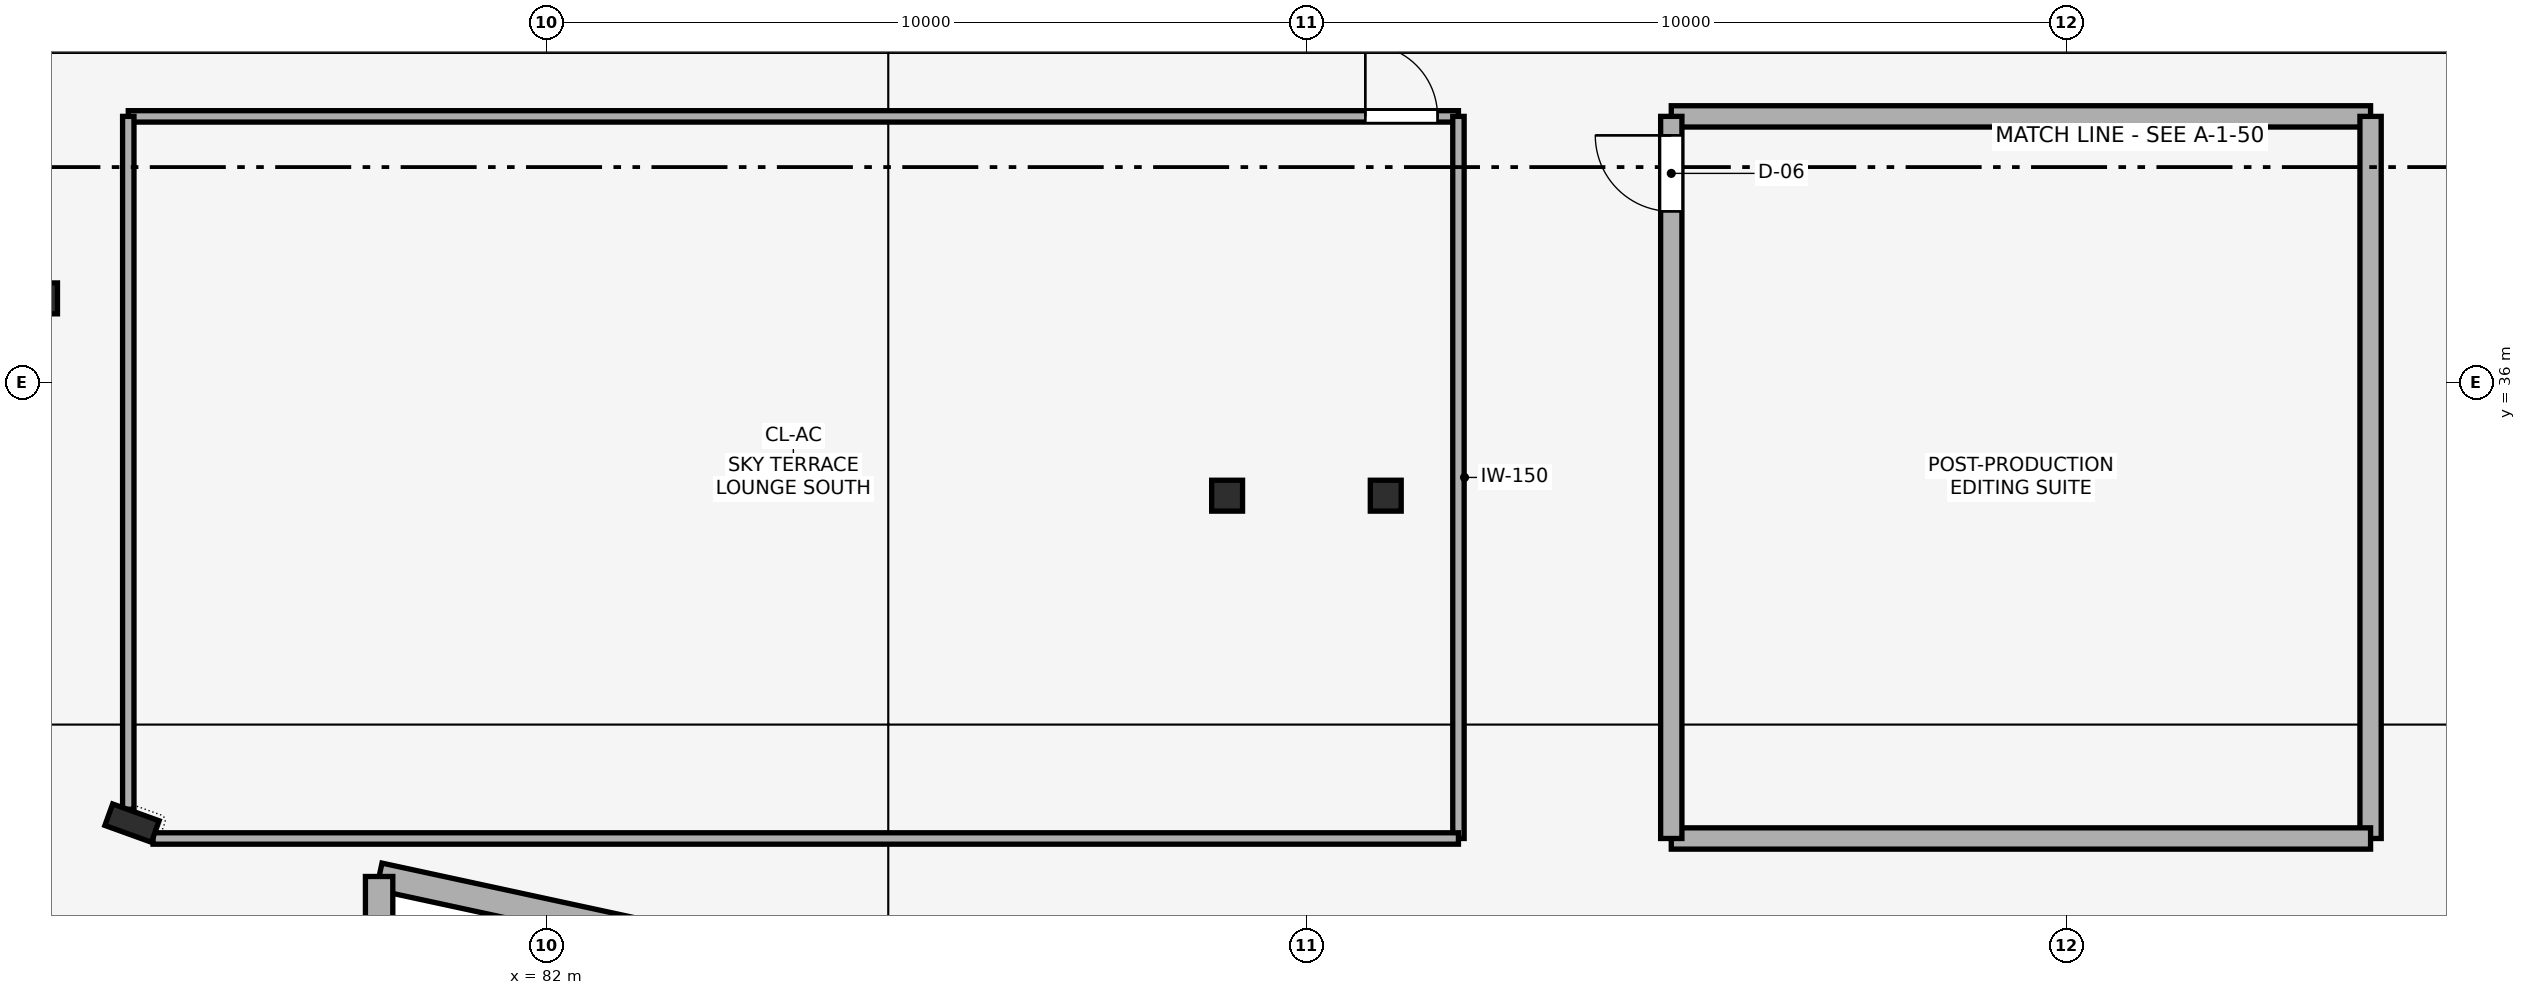
"""IFC4 building model, lengths in metres.
Left out: names, types, materials, properties, quantities, classifications, styles, units other than length and angle.
Written with IfcOpenShell. Run it as: python <this file> out.ifc"""

import sys

from ifc_helpers import new_model, si_unit, direction, frame, frame_2d, origin, origin_2d, place, context, subcontext, project, spatial, rectangle, hollow_circle, i_section, extrude, element, fill, save


model = new_model("IFC4")
c1 = context("Model", 3, precision=1e-05, world=origin(), true_north=direction((0.0, 1.0)))
c2 = subcontext(c1, "Body", "Model", "MODEL_VIEW")
j1 = project(units=[si_unit("LENGTHUNIT", "METRE"), si_unit("PLANEANGLEUNIT", "RADIAN")], contexts=[c1])
p1 = place(None, origin())
s1 = spatial("IfcSite", under=j1, at=p1, CompositionType="ELEMENT")
p2 = place(p1, origin())
s2 = spatial("IfcBuilding", under=s1, at=p2, CompositionType="ELEMENT")
p3 = place(p2, frame((0.0, 0.0, 19.5)))
s3 = spatial("IfcBuildingStorey", under=s2, at=p3, CompositionType="ELEMENT", Elevation=19.5)
p4 = place(p3, frame((76.549, 30.202, 0.0), z_axis=(0.0, 0.0, 1.0), x_axis=(-0.339558864524, -0.94058480613, 0.0)))
e1 = element("IfcColumn", 1, at=p4, inside=s3, PredefinedType="COLUMN", context=c2, shape_type="SweptSolid", body=[
    extrude(i_section(OverallWidth=0.3, OverallDepth=0.65, WebThickness=0.016, FlangeThickness=0.031, FilletRadius=0.027, at=origin_2d()), origin(), (0.0, 0.0, 1.0), 4.5),
])
for number, where, z_axis, x_axis in (
    (2, (75.365, 37.105, 0.0), (0.0, 0.0, 1.0), (1.0, 0.0, 0.0)),
    (3, (90.956, 34.51, 0.0), (0.0, 0.0, 1.0), (1.0, 0.0, 0.0)),
    (4, (93.044, 34.51, 0.0), (0.0, 0.0, 1.0), (1.0, 0.0, 0.0)),
):
    element("IfcColumn", number, at=place(p3, frame(where, z_axis=z_axis, x_axis=x_axis)), inside=s3, PredefinedType="COLUMN", context=c2, shape_type="SweptSolid", body=[
        extrude(hollow_circle(Radius=0.203, WallThickness=0.016, at=origin_2d()), origin(), (0.0, 0.0, 1.0), 4.5),
    ])
p5 = place(p3, frame((83.858, 28.623, 0.0), z_axis=(0.0, 0.0, 1.0), x_axis=(-0.9774404191, 0.211211332816, 0.0)))
e5 = element("IfcWall", 5, at=p5, inside=s3, PredefinedType="STANDARD", context=c2, shape_type="SweptSolid", body=[
    extrude(rectangle(XDim=4.152, YDim=0.36, at=frame_2d((2.076, 0.0))), origin(), (0.0, 0.0, 1.0), 3.562),
])
p6 = place(p3, frame((79.8, 29.5, 0.0), z_axis=(0.0, 0.0, 1.0), x_axis=(0.0, -1.0, 0.0)))
e6 = element("IfcWall", 6, at=p6, inside=s3, PredefinedType="STANDARD", context=c2, shape_type="SweptSolid", body=[
    extrude(rectangle(XDim=7.3, YDim=0.36, at=frame_2d((3.65, 0.0))), origin(), (0.0, 0.0, 1.0), 4.25),
])
p7 = place(p6, frame((2.25, 0.0, 0.9)))
e7 = element("IfcOpeningElement", 7, at=p7, cuts=e6, PredefinedType="OPENING", context=c2, shape_type="SweptSolid", body=[
    extrude(rectangle(XDim=2.8, YDim=1.9, at=frame_2d((1.4, 0.95))), frame((0.0, 0.19, 0.0), z_axis=(0.0, -1.0, 0.0), x_axis=(1.0, 0.0, 0.0)), (0.0, 0.0, 1.0), 0.38),
])
p8 = place(p3, frame((76.5, 39.5, 0.0), z_axis=(0.0, 0.0, 1.0), x_axis=(1.0, 0.0, 0.0)))
e8 = element("IfcWall", 8, at=p8, inside=s3, PredefinedType="PARTITIONING", context=c2, shape_type="SweptSolid", body=[
    extrude(rectangle(XDim=17.5, YDim=0.15, at=frame_2d((8.75, 0.0))), origin(), (0.0, 0.0, 1.0), 4.25),
])
p9 = place(p8, frame((16.275, 0.0, 0.0)))
e9 = element("IfcOpeningElement", 9, at=p9, cuts=e8, PredefinedType="OPENING", context=c2, shape_type="SweptSolid", body=[
    extrude(rectangle(XDim=0.95, YDim=2.1, at=frame_2d((0.475, 1.05))), frame((0.0, 0.085, 0.0), z_axis=(0.0, -1.0, 0.0), x_axis=(1.0, 0.0, 0.0)), (0.0, 0.0, 1.0), 0.17),
])
p10 = place(p3, frame((94.0, 39.5, 0.0), z_axis=(0.0, 0.0, 1.0), x_axis=(0.0, -1.0, 0.0)))
e10 = element("IfcWall", 10, at=p10, inside=s3, PredefinedType="PARTITIONING", context=c2, shape_type="SweptSolid", body=[
    extrude(rectangle(XDim=9.5, YDim=0.15, at=frame_2d((4.75, 0.0))), origin(), (0.0, 0.0, 1.0), 4.25),
])
p11 = place(p3, frame((94.0, 30.0, 0.0), z_axis=(0.0, 0.0, 1.0), x_axis=(-1.0, 0.0, 0.0)))
e11 = element("IfcWall", 11, at=p11, inside=s3, PredefinedType="PARTITIONING", context=c2, shape_type="SweptSolid", body=[
    extrude(rectangle(XDim=17.174, YDim=0.15, at=frame_2d((8.587, 0.0))), origin(), (0.0, 0.0, 1.0), 3.562),
])
p12 = place(p3, frame((76.5, 30.384, 0.0), z_axis=(0.0, 0.0, 1.0), x_axis=(0.0, 1.0, 0.0)))
e12 = element("IfcWall", 12, at=p12, inside=s3, PredefinedType="PARTITIONING", context=c2, shape_type="SweptSolid", body=[
    extrude(rectangle(XDim=9.116, YDim=0.15, at=frame_2d((4.558, 0.0))), origin(), (0.0, 0.0, 1.0), 3.562),
])
p13 = place(p3, frame((96.8, 39.5, 0.0), z_axis=(0.0, 0.0, 1.0), x_axis=(1.0, 0.0, 0.0)))
e13 = element("IfcWall", 13, at=p13, inside=s3, PredefinedType="PARTITIONING", context=c2, shape_type="SweptSolid", body=[
    extrude(rectangle(XDim=9.2, YDim=0.28, at=frame_2d((4.6, 0.0))), origin(), (0.0, 0.0, 1.0), 4.25),
])
p14 = place(p3, frame((106.0, 39.5, 0.0), z_axis=(0.0, 0.0, 1.0), x_axis=(0.0, -1.0, 0.0)))
e14 = element("IfcWall", 14, at=p14, inside=s3, PredefinedType="PARTITIONING", context=c2, shape_type="SweptSolid", body=[
    extrude(rectangle(XDim=9.5, YDim=0.28, at=frame_2d((4.75, 0.0))), origin(), (0.0, 0.0, 1.0), 4.25),
])
p15 = place(p3, frame((106.0, 30.0, 0.0), z_axis=(0.0, 0.0, 1.0), x_axis=(-1.0, 0.0, 0.0)))
e15 = element("IfcWall", 15, at=p15, inside=s3, PredefinedType="PARTITIONING", context=c2, shape_type="SweptSolid", body=[
    extrude(rectangle(XDim=9.2, YDim=0.28, at=frame_2d((4.6, 0.0))), origin(), (0.0, 0.0, 1.0), 3.562),
])
p16 = place(p3, frame((96.8, 30.0, 0.0), z_axis=(0.0, 0.0, 1.0), x_axis=(0.0, 1.0, 0.0)))
e16 = element("IfcWall", 16, at=p16, inside=s3, PredefinedType="PARTITIONING", context=c2, shape_type="SweptSolid", body=[
    extrude(rectangle(XDim=9.5, YDim=0.28, at=frame_2d((4.75, 0.0))), origin(), (0.0, 0.0, 1.0), 4.25),
])
p17 = place(p16, frame((8.25, 0.0, 0.0)))
e17 = element("IfcOpeningElement", 17, at=p17, cuts=e16, PredefinedType="OPENING", context=c2, shape_type="SweptSolid", body=[
    extrude(rectangle(XDim=1.0, YDim=2.15, at=frame_2d((0.5, 1.075))), frame((0.0, 0.15, 0.0), z_axis=(0.0, -1.0, 0.0), x_axis=(1.0, 0.0, 0.0)), (0.0, 0.0, 1.0), 0.3),
])
p18 = place(p9, origin())
e18 = element("IfcDoor", 18, at=p18, inside=s3, OperationType="SINGLE_SWING_LEFT", PredefinedType="DOOR", context=c2, shape_type="SweptSolid", body=[
    extrude(rectangle(XDim=0.95, YDim=2.1, at=frame_2d((0.475, 1.05))), frame((0.0, 0.025, 0.0), z_axis=(0.0, -1.0, 0.0), x_axis=(1.0, 0.0, 0.0)), (0.0, 0.0, 1.0), 0.05),
])
fill(e9, e18)
p19 = place(p17, origin())
e19 = element("IfcDoor", 19, at=p19, inside=s3, OperationType="SINGLE_SWING_RIGHT", PredefinedType="DOOR", context=c2, shape_type="SweptSolid", body=[
    extrude(rectangle(XDim=1.0, YDim=2.15, at=frame_2d((0.5, 1.075))), frame((0.0, 0.025, 0.0), z_axis=(0.0, -1.0, 0.0), x_axis=(1.0, 0.0, 0.0)), (0.0, 0.0, 1.0), 0.05),
])
fill(e17, e19)
save(model, sys.argv[1])
